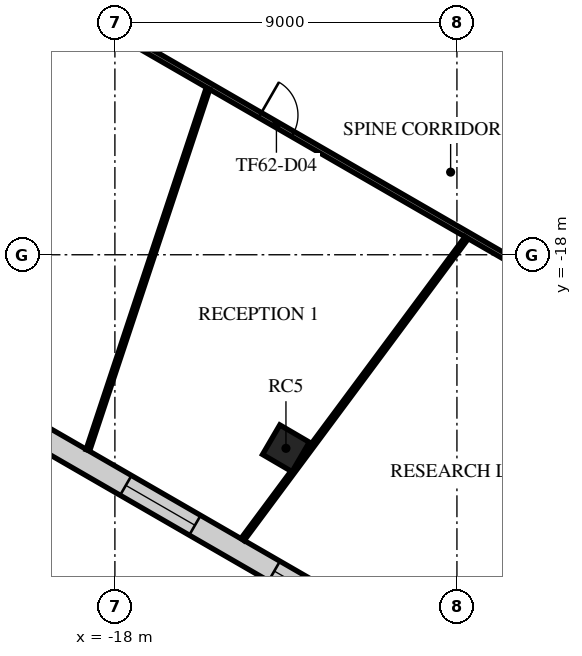
"""IFC4 building model, lengths in metres.
Left out: names, types, materials, properties, quantities, classifications, styles, units other than length and angle.
Written with IfcOpenShell. Run it as: python <this file> out.ifc"""

import sys

from ifc_helpers import new_model, si_unit, direction, frame, frame_2d, origin, origin_2d, place, context, subcontext, project, spatial, rectangle, extrude, element, fill, save


model = new_model("IFC4")
c1 = context("Model", 3, precision=1e-05, world=origin(), true_north=direction((0.0, 1.0)))
c2 = subcontext(c1, "Body", "Model", "MODEL_VIEW")
j1 = project(units=[si_unit("LENGTHUNIT", "METRE"), si_unit("PLANEANGLEUNIT", "RADIAN")], contexts=[c1])
p1 = place(None, origin())
s1 = spatial("IfcSite", under=j1, at=p1, CompositionType="ELEMENT")
p2 = place(p1, origin())
s2 = spatial("IfcBuilding", under=s1, at=p2, CompositionType="ELEMENT")
p3 = place(p2, frame((0.0, 0.0, 262.9)))
s3 = spatial("IfcBuildingStorey", under=s2, at=p3, CompositionType="ELEMENT", Elevation=262.9)
p4 = place(p3, frame((-13.499, -23.094, 0.0), z_axis=(0.0, 0.0, 1.0), x_axis=(0.504643651291, 0.863327739165, 0.0)))
e1 = element("IfcColumn", 1, at=p4, inside=s3, PredefinedType="COLUMN", context=c2, shape_type="SweptSolid", body=[
    extrude(rectangle(XDim=0.9, YDim=0.9, at=origin_2d()), origin(), (0.0, 0.0, 1.0), 4.0),
])
p5 = place(p3, frame((-30.476, -16.699, 0.0), z_axis=(0.0, 0.0, 1.0), x_axis=(0.866027969777, -0.499995555543, 0.0)))
e2 = element("IfcWall", 2, at=p5, inside=s3, PredefinedType="STANDARD", context=c2, shape_type="SweptSolid", body=[
    extrude(rectangle(XDim=36.086, YDim=0.6, at=frame_2d((18.043, 0.0))), origin(), (0.0, 0.0, 1.0), 3.64),
])
p6 = place(p5, frame((1.205, 0.0, 0.9)))
e3 = element("IfcOpeningElement", 3, at=p6, cuts=e2, PredefinedType="OPENING", context=c2, shape_type="SweptSolid", body=[
    extrude(rectangle(XDim=2.1, YDim=2.1, at=frame_2d((1.05, 1.05))), frame((0.0, 0.31, 0.0), z_axis=(0.0, -1.0, 0.0), x_axis=(1.0, 0.0, 0.0)), (0.0, 0.0, 1.0), 0.62),
])
p7 = place(p5, frame((5.716, 0.0, 0.9)))
e4 = element("IfcOpeningElement", 4, at=p7, cuts=e2, PredefinedType="OPENING", context=c2, shape_type="SweptSolid", body=[
    extrude(rectangle(XDim=2.1, YDim=2.1, at=frame_2d((1.05, 1.05))), frame((0.0, 0.31, 0.0), z_axis=(0.0, -1.0, 0.0), x_axis=(1.0, 0.0, 0.0)), (0.0, 0.0, 1.0), 0.62),
])
p8 = place(p5, frame((10.227, 0.0, 0.9)))
e5 = element("IfcOpeningElement", 5, at=p8, cuts=e2, PredefinedType="OPENING", context=c2, shape_type="SweptSolid", body=[
    extrude(rectangle(XDim=2.1, YDim=2.1, at=frame_2d((1.05, 1.05))), frame((0.0, 0.31, 0.0), z_axis=(0.0, -1.0, 0.0), x_axis=(1.0, 0.0, 0.0)), (0.0, 0.0, 1.0), 0.62),
])
p9 = place(p5, frame((14.738, 0.0, 0.9)))
e6 = element("IfcOpeningElement", 6, at=p9, cuts=e2, PredefinedType="OPENING", context=c2, shape_type="SweptSolid", body=[
    extrude(rectangle(XDim=2.1, YDim=2.1, at=frame_2d((1.05, 1.05))), frame((0.0, 0.31, 0.0), z_axis=(0.0, -1.0, 0.0), x_axis=(1.0, 0.0, 0.0)), (0.0, 0.0, 1.0), 0.62),
])
p10 = place(p5, frame((19.249, 0.0, 0.9)))
e7 = element("IfcOpeningElement", 7, at=p10, cuts=e2, PredefinedType="OPENING", context=c2, shape_type="SweptSolid", body=[
    extrude(rectangle(XDim=2.1, YDim=2.1, at=frame_2d((1.05, 1.05))), frame((0.0, 0.31, 0.0), z_axis=(0.0, -1.0, 0.0), x_axis=(1.0, 0.0, 0.0)), (0.0, 0.0, 1.0), 0.62),
])
p11 = place(p5, frame((23.759, 0.0, 0.9)))
e8 = element("IfcOpeningElement", 8, at=p11, cuts=e2, PredefinedType="OPENING", context=c2, shape_type="SweptSolid", body=[
    extrude(rectangle(XDim=2.1, YDim=2.1, at=frame_2d((1.05, 1.05))), frame((0.0, 0.31, 0.0), z_axis=(0.0, -1.0, 0.0), x_axis=(1.0, 0.0, 0.0)), (0.0, 0.0, 1.0), 0.62),
])
p12 = place(p5, frame((28.27, 0.0, 0.9)))
e9 = element("IfcOpeningElement", 9, at=p12, cuts=e2, PredefinedType="OPENING", context=c2, shape_type="SweptSolid", body=[
    extrude(rectangle(XDim=2.1, YDim=2.1, at=frame_2d((1.05, 1.05))), frame((0.0, 0.31, 0.0), z_axis=(0.0, -1.0, 0.0), x_axis=(1.0, 0.0, 0.0)), (0.0, 0.0, 1.0), 0.62),
])
p13 = place(p5, frame((32.781, 0.0, 0.9)))
e10 = element("IfcOpeningElement", 10, at=p13, cuts=e2, PredefinedType="OPENING", context=c2, shape_type="SweptSolid", body=[
    extrude(rectangle(XDim=2.1, YDim=2.1, at=frame_2d((1.05, 1.05))), frame((0.0, 0.31, 0.0), z_axis=(0.0, -1.0, 0.0), x_axis=(1.0, 0.0, 0.0)), (0.0, 0.0, 1.0), 0.62),
])
p14 = place(p3, frame((-26.744, -7.073, 0.0), z_axis=(0.0, 0.0, 1.0), x_axis=(0.866020890374, -0.500007817374, 0.0)))
e11 = element("IfcWall", 11, at=p14, inside=s3, PredefinedType="PARTITIONING", context=c2, shape_type="SweptSolid", body=[
    extrude(rectangle(XDim=39.324, YDim=0.15, at=frame_2d((19.662, 0.0))), origin(), (0.0, 0.0, 1.0), 3.04),
])
p15 = place(p14, frame((14.505, 0.0, 0.0)))
e12 = element("IfcOpeningElement", 12, at=p15, cuts=e11, PredefinedType="OPENING", context=c2, shape_type="SweptSolid", body=[
    extrude(rectangle(XDim=1.0, YDim=2.1, at=frame_2d((0.5, 1.05))), frame((0.0, 0.085, 0.0), z_axis=(0.0, -1.0, 0.0), x_axis=(1.0, 0.0, 0.0)), (0.0, 0.0, 1.0), 0.17),
])
p16 = place(p14, frame((22.632, 0.0, 0.0)))
e13 = element("IfcOpeningElement", 13, at=p16, cuts=e11, PredefinedType="OPENING", context=c2, shape_type="SweptSolid", body=[
    extrude(rectangle(XDim=1.0, YDim=2.1, at=frame_2d((0.5, 1.05))), frame((0.0, 0.085, 0.0), z_axis=(0.0, -1.0, 0.0), x_axis=(1.0, 0.0, 0.0)), (0.0, 0.0, 1.0), 0.17),
])
p17 = place(p14, frame((36.852, 0.0, 0.0)))
e14 = element("IfcOpeningElement", 14, at=p17, cuts=e11, PredefinedType="OPENING", context=c2, shape_type="SweptSolid", body=[
    extrude(rectangle(XDim=1.8, YDim=2.1, at=frame_2d((0.9, 1.05))), frame((0.0, 0.085, 0.0), z_axis=(0.0, -1.0, 0.0), x_axis=(1.0, 0.0, 0.0)), (0.0, 0.0, 1.0), 0.17),
])
p18 = place(p14, frame((29.852, 0.0, 0.0)))
e15 = element("IfcOpeningElement", 15, at=p18, cuts=e11, PredefinedType="OPENING", context=c2, shape_type="SweptSolid", body=[
    extrude(rectangle(XDim=1.0, YDim=2.1, at=frame_2d((0.5, 1.05))), frame((0.0, 0.085, 0.0), z_axis=(0.0, -1.0, 0.0), x_axis=(1.0, 0.0, 0.0)), (0.0, 0.0, 1.0), 0.17),
])
p19 = place(p3, frame((-18.711, -23.143, 0.0), z_axis=(0.0, 0.0, 1.0), x_axis=(0.315197061925, 0.949026244186, 0.0)))
e16 = element("IfcWall", 16, at=p19, inside=s3, PredefinedType="PARTITIONING", context=c2, shape_type="SweptSolid", body=[
    extrude(rectangle(XDim=10.021, YDim=0.1, at=frame_2d((5.011, 0.0))), origin(), (0.0, 0.0, 1.0), 3.04),
])
p20 = place(p3, frame((-14.64, -25.493, 0.0), z_axis=(0.0, 0.0, 1.0), x_axis=(0.596096620962, 0.802912709127, 0.0)))
e17 = element("IfcWall", 17, at=p20, inside=s3, PredefinedType="PARTITIONING", context=c2, shape_type="SweptSolid", body=[
    extrude(rectangle(XDim=9.885, YDim=0.1, at=frame_2d((4.943, 0.0))), origin(), (0.0, 0.0, 1.0), 3.04),
])
p21 = place(p9, origin())
e18 = element("IfcWindow", 18, at=p21, inside=s3, PartitioningType="SINGLE_PANEL", PredefinedType="WINDOW", context=c2, shape_type="SweptSolid", body=[
    extrude(rectangle(XDim=2.1, YDim=2.1, at=frame_2d((1.05, 1.05))), frame((0.0, 0.03, 0.0), z_axis=(0.0, -1.0, 0.0), x_axis=(1.0, 0.0, 0.0)), (0.0, 0.0, 1.0), 0.06),
])
fill(e6, e18)
p22 = place(p10, origin())
e19 = element("IfcWindow", 19, at=p22, inside=s3, PartitioningType="SINGLE_PANEL", PredefinedType="WINDOW", context=c2, shape_type="SweptSolid", body=[
    extrude(rectangle(XDim=2.1, YDim=2.1, at=frame_2d((1.05, 1.05))), frame((0.0, 0.03, 0.0), z_axis=(0.0, -1.0, 0.0), x_axis=(1.0, 0.0, 0.0)), (0.0, 0.0, 1.0), 0.06),
])
fill(e7, e19)
p23 = place(p15, frame((1.0, 0.0, 0.0), z_axis=(0.0, 0.0, 1.0), x_axis=(-1.0, 0.0, 0.0)))
e20 = element("IfcDoor", 20, at=p23, inside=s3, OperationType="SINGLE_SWING_LEFT", PredefinedType="DOOR", context=c2, shape_type="SweptSolid", body=[
    extrude(rectangle(XDim=1.0, YDim=2.1, at=frame_2d((0.5, 1.05))), frame((0.0, 0.025, 0.0), z_axis=(0.0, -1.0, 0.0), x_axis=(1.0, 0.0, 0.0)), (0.0, 0.0, 1.0), 0.05),
])
fill(e12, e20)
save(model, sys.argv[1])
